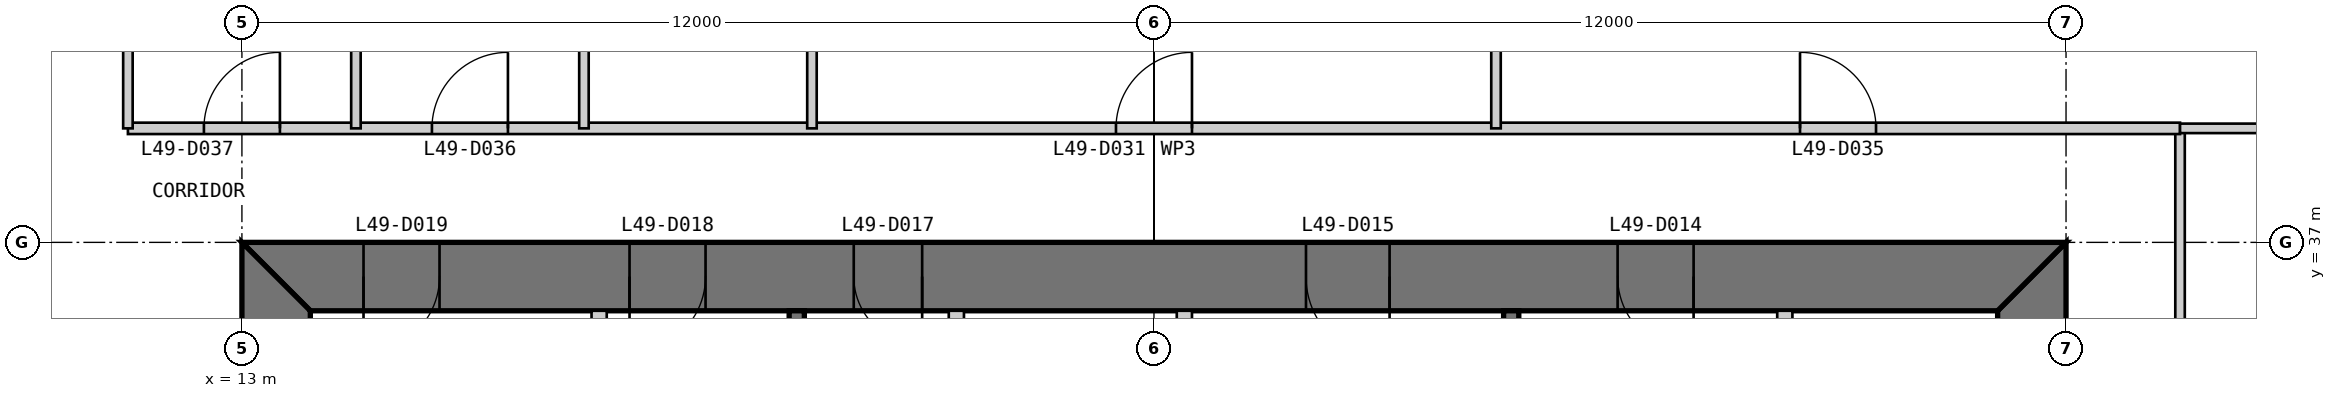
"""IFC4 building model, lengths in metres.
Left out: names, types, materials, properties, quantities, classifications, styles, units other than length and angle.
Written with IfcOpenShell. Run it as: python <this file> out.ifc"""

import sys

from ifc_helpers import new_model, si_unit, direction, frame, frame_2d, origin, place, context, subcontext, project, spatial, polyline, rectangle, outline, extrude, element, fill, save


model = new_model("IFC4")
c1 = context("Model", 3, precision=1e-05, world=origin(), true_north=direction((0.0, 1.0)))
c2 = subcontext(c1, "Body", "Model", "MODEL_VIEW")
j1 = project(units=[si_unit("LENGTHUNIT", "METRE"), si_unit("PLANEANGLEUNIT", "RADIAN")], contexts=[c1])
p1 = place(None, origin())
s1 = spatial("IfcSite", under=j1, at=p1, CompositionType="ELEMENT")
p2 = place(p1, origin())
s2 = spatial("IfcBuilding", under=s1, at=p2, CompositionType="ELEMENT")
p3 = place(p2, frame((0.0, 0.0, 209.8)))
s3 = spatial("IfcBuildingStorey", under=s2, at=p3, CompositionType="ELEMENT", Elevation=209.8)
p4 = place(p3, frame((36.55, 13.9, 0.0), z_axis=(0.0, 0.0, 1.0), x_axis=(0.0, 1.0, 0.0)))
e1 = element("IfcWall", 1, at=p4, inside=s3, PredefinedType="SHEAR", context=c2, shape_type="SweptSolid", body=[
    extrude(outline(polyline([(-0.9, -0.45), (23.1, -0.45), (22.2, 0.45), (0.0, 0.45), (-0.9, -0.45)])), origin(), (0.0, 0.0, 1.0), 4.0),
])
p5 = place(p4, frame((20.2, 0.0, 0.0)))
e2 = element("IfcOpeningElement", 2, at=p5, cuts=e1, PredefinedType="OPENING", context=c2, shape_type="SweptSolid", body=[
    extrude(rectangle(XDim=1.0, YDim=2.2, at=frame_2d((0.5, 1.1))), frame((0.0, 0.46, 0.0), z_axis=(0.0, -1.0, 0.0), x_axis=(1.0, 0.0, 0.0)), (0.0, 0.0, 1.0), 0.92),
])
p6 = place(p4, frame((17.25, 0.0, 0.0)))
e3 = element("IfcOpeningElement", 3, at=p6, cuts=e1, PredefinedType="OPENING", context=c2, shape_type="SweptSolid", body=[
    extrude(rectangle(XDim=0.9, YDim=2.2, at=frame_2d((0.45, 1.1))), frame((0.0, 0.46, 0.0), z_axis=(0.0, -1.0, 0.0), x_axis=(1.0, 0.0, 0.0)), (0.0, 0.0, 1.0), 0.92),
])
p7 = place(p3, frame((37.0, 36.55, 0.0), z_axis=(0.0, 0.0, 1.0), x_axis=(-1.0, 0.0, 0.0)))
e4 = element("IfcWall", 4, at=p7, inside=s3, PredefinedType="SHEAR", context=c2, shape_type="SweptSolid", body=[
    extrude(outline(polyline([(0.0, -0.45), (24.0, -0.45), (23.1, 0.45), (0.9, 0.45), (0.0, -0.45)])), origin(), (0.0, 0.0, 1.0), 4.0),
])
p8 = place(p7, frame((4.9, 0.0, 0.0)))
e5 = element("IfcOpeningElement", 5, at=p8, cuts=e4, PredefinedType="OPENING", context=c2, shape_type="SweptSolid", body=[
    extrude(rectangle(XDim=1.0, YDim=2.2, at=frame_2d((0.5, 1.1))), frame((0.0, 0.46, 0.0), z_axis=(0.0, -1.0, 0.0), x_axis=(1.0, 0.0, 0.0)), (0.0, 0.0, 1.0), 0.92),
])
p9 = place(p7, frame((8.9, 0.0, 0.0)))
e6 = element("IfcOpeningElement", 6, at=p9, cuts=e4, PredefinedType="OPENING", context=c2, shape_type="SweptSolid", body=[
    extrude(rectangle(XDim=1.1, YDim=2.2, at=frame_2d((0.55, 1.1))), frame((0.0, 0.46, 0.0), z_axis=(0.0, -1.0, 0.0), x_axis=(1.0, 0.0, 0.0)), (0.0, 0.0, 1.0), 0.92),
])
p10 = place(p7, frame((15.05, 0.0, 0.0)))
e7 = element("IfcOpeningElement", 7, at=p10, cuts=e4, PredefinedType="OPENING", context=c2, shape_type="SweptSolid", body=[
    extrude(rectangle(XDim=0.9, YDim=2.2, at=frame_2d((0.45, 1.1))), frame((0.0, 0.46, 0.0), z_axis=(0.0, -1.0, 0.0), x_axis=(1.0, 0.0, 0.0)), (0.0, 0.0, 1.0), 0.92),
])
p11 = place(p7, frame((17.9, 0.0, 0.0)))
e8 = element("IfcOpeningElement", 8, at=p11, cuts=e4, PredefinedType="OPENING", context=c2, shape_type="SweptSolid", body=[
    extrude(rectangle(XDim=1.0, YDim=2.2, at=frame_2d((0.5, 1.1))), frame((0.0, 0.46, 0.0), z_axis=(0.0, -1.0, 0.0), x_axis=(1.0, 0.0, 0.0)), (0.0, 0.0, 1.0), 0.92),
])
p12 = place(p7, frame((21.4, 0.0, 0.0)))
e9 = element("IfcOpeningElement", 9, at=p12, cuts=e4, PredefinedType="OPENING", context=c2, shape_type="SweptSolid", body=[
    extrude(rectangle(XDim=1.0, YDim=2.2, at=frame_2d((0.5, 1.1))), frame((0.0, 0.46, 0.0), z_axis=(0.0, -1.0, 0.0), x_axis=(1.0, 0.0, 0.0)), (0.0, 0.0, 1.0), 0.92),
])
p13 = place(p3, frame((13.45, 36.1, 0.0), z_axis=(0.0, 0.0, 1.0), x_axis=(0.0, -1.0, 0.0)))
e10 = element("IfcWall", 10, at=p13, inside=s3, PredefinedType="SHEAR", context=c2, shape_type="SweptSolid", body=[
    extrude(outline(polyline([(-0.9, -0.45), (23.1, -0.45), (22.2, 0.45), (0.0, 0.45), (-0.9, -0.45)])), origin(), (0.0, 0.0, 1.0), 4.0),
])
p14 = place(p13, frame((20.2, 0.0, 0.0)))
e11 = element("IfcOpeningElement", 11, at=p14, cuts=e10, PredefinedType="OPENING", context=c2, shape_type="SweptSolid", body=[
    extrude(rectangle(XDim=1.0, YDim=2.2, at=frame_2d((0.5, 1.1))), frame((0.0, 0.46, 0.0), z_axis=(0.0, -1.0, 0.0), x_axis=(1.0, 0.0, 0.0)), (0.0, 0.0, 1.0), 0.92),
])
p15 = place(p13, frame((17.25, 0.0, 0.0)))
e12 = element("IfcOpeningElement", 12, at=p15, cuts=e10, PredefinedType="OPENING", context=c2, shape_type="SweptSolid", body=[
    extrude(rectangle(XDim=0.9, YDim=2.2, at=frame_2d((0.45, 1.1))), frame((0.0, 0.46, 0.0), z_axis=(0.0, -1.0, 0.0), x_axis=(1.0, 0.0, 0.0)), (0.0, 0.0, 1.0), 0.92),
])
p16 = place(p3, frame((33.3, 36.1, 0.0), z_axis=(0.0, 0.0, 1.0), x_axis=(0.0, -1.0, 0.0)))
e13 = element("IfcWall", 13, at=p16, inside=s3, PredefinedType="PARTITIONING", context=c2, shape_type="SweptSolid", body=[
    extrude(rectangle(XDim=16.1, YDim=0.2, at=frame_2d((8.05, 0.0))), origin(), (0.0, 0.0, 1.0), 3.8),
])
p17 = place(p3, frame((29.7, 36.1, 0.0), z_axis=(0.0, 0.0, 1.0), x_axis=(0.0, -1.0, 0.0)))
e14 = element("IfcWall", 14, at=p17, inside=s3, PredefinedType="SOLIDWALL", context=c2, shape_type="SweptSolid", body=[
    extrude(rectangle(XDim=16.1, YDim=0.2, at=frame_2d((8.05, 0.0))), origin(), (0.0, 0.0, 1.0), 3.8),
])
p18 = place(p17, frame((7.217, 0.0, 0.0)))
e15 = element("IfcOpeningElement", 15, at=p18, cuts=e14, PredefinedType="OPENING", context=c2, shape_type="SweptSolid", body=[
    extrude(rectangle(XDim=1.1, YDim=2.2, at=frame_2d((0.55, 1.1))), frame((0.0, 0.11, 0.0), z_axis=(0.0, -1.0, 0.0), x_axis=(1.0, 0.0, 0.0)), (0.0, 0.0, 1.0), 0.22),
])
p19 = place(p17, frame((10.55, 0.0, 0.0)))
e16 = element("IfcOpeningElement", 16, at=p19, cuts=e14, PredefinedType="OPENING", context=c2, shape_type="SweptSolid", body=[
    extrude(rectangle(XDim=1.1, YDim=2.2, at=frame_2d((0.55, 1.1))), frame((0.0, 0.11, 0.0), z_axis=(0.0, -1.0, 0.0), x_axis=(1.0, 0.0, 0.0)), (0.0, 0.0, 1.0), 0.22),
])
p20 = place(p17, frame((13.883, 0.0, 0.0)))
e17 = element("IfcOpeningElement", 17, at=p20, cuts=e14, PredefinedType="OPENING", context=c2, shape_type="SweptSolid", body=[
    extrude(rectangle(XDim=1.1, YDim=2.2, at=frame_2d((0.55, 1.1))), frame((0.0, 0.11, 0.0), z_axis=(0.0, -1.0, 0.0), x_axis=(1.0, 0.0, 0.0)), (0.0, 0.0, 1.0), 0.22),
])
p21 = place(p3, frame((25.4, 36.1, 0.0), z_axis=(0.0, 0.0, 1.0), x_axis=(0.0, -1.0, 0.0)))
e18 = element("IfcWall", 18, at=p21, inside=s3, PredefinedType="PARTITIONING", context=c2, shape_type="SweptSolid", body=[
    extrude(rectangle(XDim=3.3, YDim=0.2, at=frame_2d((1.65, 0.0))), origin(), (0.0, 0.0, 1.0), 3.8),
])
p22 = place(p21, frame((0.9, 0.0, 0.0)))
e19 = element("IfcOpeningElement", 19, at=p22, cuts=e18, PredefinedType="OPENING", context=c2, shape_type="SweptSolid", body=[
    extrude(rectangle(XDim=1.1, YDim=2.2, at=frame_2d((0.55, 1.1))), frame((0.0, 0.11, 0.0), z_axis=(0.0, -1.0, 0.0), x_axis=(1.0, 0.0, 0.0)), (0.0, 0.0, 1.0), 0.22),
])
p23 = place(p3, frame((22.4, 36.1, 0.0), z_axis=(0.0, 0.0, 1.0), x_axis=(0.0, -1.0, 0.0)))
e20 = element("IfcWall", 20, at=p23, inside=s3, PredefinedType="PARTITIONING", context=c2, shape_type="SweptSolid", body=[
    extrude(rectangle(XDim=3.3, YDim=0.2, at=frame_2d((1.65, 0.0))), origin(), (0.0, 0.0, 1.0), 3.8),
])
p24 = place(p3, frame((20.3, 36.1, 0.0), z_axis=(0.0, 0.0, 1.0), x_axis=(0.0, -1.0, 0.0)))
e21 = element("IfcWall", 21, at=p24, inside=s3, PredefinedType="SOLIDWALL", context=c2, shape_type="SweptSolid", body=[
    extrude(rectangle(XDim=6.1, YDim=0.2, at=frame_2d((3.05, 0.0))), origin(), (0.0, 0.0, 1.0), 3.8),
])
p25 = place(p3, frame((17.7, 36.1, 0.0), z_axis=(0.0, 0.0, 1.0), x_axis=(0.0, -1.0, 0.0)))
e22 = element("IfcWall", 22, at=p25, inside=s3, PredefinedType="PARTITIONING", context=c2, shape_type="SweptSolid", body=[
    extrude(rectangle(XDim=6.1, YDim=0.2, at=frame_2d((3.05, 0.0))), origin(), (0.0, 0.0, 1.0), 3.8),
])
p26 = place(p3, frame((38.5, 35.5, 0.0), z_axis=(0.0, 0.0, 1.0), x_axis=(0.0, 1.0, 0.0)))
e23 = element("IfcWall", 23, at=p26, inside=s3, PredefinedType="PARTITIONING", context=c2, shape_type="SweptSolid", body=[
    extrude(rectangle(XDim=3.0, YDim=0.125, at=frame_2d((1.5, 0.0))), origin(), (0.0, 0.0, 1.0), 3.85),
])
p27 = place(p3, frame((38.5, 38.5, 0.0), z_axis=(0.0, 0.0, 1.0), x_axis=(-1.0, 0.0, 0.0)))
e24 = element("IfcWall", 24, at=p27, inside=s3, PredefinedType="PARTITIONING", context=c2, shape_type="SweptSolid", body=[
    extrude(rectangle(XDim=27.0, YDim=0.15, at=frame_2d((13.5, 0.0))), origin(), (0.0, 0.0, 1.0), 3.85),
])
p28 = place(p27, frame((13.0, 0.0, 0.0)))
e25 = element("IfcOpeningElement", 25, at=p28, cuts=e24, PredefinedType="OPENING", context=c2, shape_type="SweptSolid", body=[
    extrude(rectangle(XDim=1.0, YDim=2.2, at=frame_2d((0.5, 1.1))), frame((0.0, 0.085, 0.0), z_axis=(0.0, -1.0, 0.0), x_axis=(1.0, 0.0, 0.0)), (0.0, 0.0, 1.0), 0.17),
])
p29 = place(p27, frame((4.0, 0.0, 0.0)))
e26 = element("IfcOpeningElement", 26, at=p29, cuts=e24, PredefinedType="OPENING", context=c2, shape_type="SweptSolid", body=[
    extrude(rectangle(XDim=1.0, YDim=2.2, at=frame_2d((0.5, 1.1))), frame((0.0, 0.085, 0.0), z_axis=(0.0, -1.0, 0.0), x_axis=(1.0, 0.0, 0.0)), (0.0, 0.0, 1.0), 0.17),
])
p30 = place(p27, frame((22.0, 0.0, 0.0)))
e27 = element("IfcOpeningElement", 27, at=p30, cuts=e24, PredefinedType="OPENING", context=c2, shape_type="SweptSolid", body=[
    extrude(rectangle(XDim=1.0, YDim=2.2, at=frame_2d((0.5, 1.1))), frame((0.0, 0.085, 0.0), z_axis=(0.0, -1.0, 0.0), x_axis=(1.0, 0.0, 0.0)), (0.0, 0.0, 1.0), 0.17),
])
p31 = place(p27, frame((25.0, 0.0, 0.0)))
e28 = element("IfcOpeningElement", 28, at=p31, cuts=e24, PredefinedType="OPENING", context=c2, shape_type="SweptSolid", body=[
    extrude(rectangle(XDim=1.0, YDim=2.2, at=frame_2d((0.5, 1.1))), frame((0.0, 0.085, 0.0), z_axis=(0.0, -1.0, 0.0), x_axis=(1.0, 0.0, 0.0)), (0.0, 0.0, 1.0), 0.17),
])
for number, where, z_axis, x_axis in (
    (29, (49.85, 38.5, 0.0), (0.0, 0.0, 1.0), (-1.0, 0.0, 0.0)),
    (30, (29.5, 49.85, 0.0), (0.0, 0.0, 1.0), (0.0, -1.0, 0.0)),
):
    element("IfcWall", number, at=place(p3, frame(where, z_axis=z_axis, x_axis=x_axis)), inside=s3, PredefinedType="PARTITIONING", context=c2, shape_type="SweptSolid", body=[
        extrude(rectangle(XDim=11.35, YDim=0.125, at=frame_2d((5.675, 0.0))), origin(), (0.0, 0.0, 1.0), 3.85),
    ])
p32 = place(p3, frame((20.5, 46.0, 0.0), z_axis=(0.0, 0.0, 1.0), x_axis=(0.0, -1.0, 0.0)))
e31 = element("IfcWall", 31, at=p32, inside=s3, PredefinedType="PARTITIONING", context=c2, shape_type="SweptSolid", body=[
    extrude(rectangle(XDim=7.5, YDim=0.125, at=frame_2d((3.75, 0.0))), origin(), (0.0, 0.0, 1.0), 3.85),
])
p33 = place(p32, frame((3.3, 0.0, 0.0)))
e32 = element("IfcOpeningElement", 32, at=p33, cuts=e31, PredefinedType="OPENING", context=c2, shape_type="SweptSolid", body=[
    extrude(rectangle(XDim=0.9, YDim=2.2, at=frame_2d((0.45, 1.1))), frame((0.0, 0.073, 0.0), z_axis=(0.0, -1.0, 0.0), x_axis=(1.0, 0.0, 0.0)), (0.0, 0.0, 1.0), 0.145),
])
p34 = place(p3, frame((17.5, 49.85, 0.0), z_axis=(0.0, 0.0, 1.0), x_axis=(0.0, -1.0, 0.0)))
e33 = element("IfcWall", 33, at=p34, inside=s3, PredefinedType="PARTITIONING", context=c2, shape_type="SweptSolid", body=[
    extrude(rectangle(XDim=11.35, YDim=0.125, at=frame_2d((5.675, 0.0))), origin(), (0.0, 0.0, 1.0), 3.85),
])
p35 = place(p3, frame((14.5, 46.0, 0.0), z_axis=(0.0, 0.0, 1.0), x_axis=(0.0, -1.0, 0.0)))
e34 = element("IfcWall", 34, at=p35, inside=s3, PredefinedType="PARTITIONING", context=c2, shape_type="SweptSolid", body=[
    extrude(rectangle(XDim=7.5, YDim=0.125, at=frame_2d((3.75, 0.0))), origin(), (0.0, 0.0, 1.0), 3.85),
])
p36 = place(p3, frame((11.5, 49.85, 0.0), z_axis=(0.0, 0.0, 1.0), x_axis=(0.0, -1.0, 0.0)))
e35 = element("IfcWall", 35, at=p36, inside=s3, PredefinedType="PARTITIONING", context=c2, shape_type="SweptSolid", body=[
    extrude(rectangle(XDim=11.35, YDim=0.125, at=frame_2d((5.675, 0.0))), origin(), (0.0, 0.0, 1.0), 3.85),
])
p37 = place(p8, origin())
e36 = element("IfcDoor", 36, at=p37, inside=s3, OperationType="SINGLE_SWING_LEFT", PredefinedType="DOOR", context=c2, shape_type="SweptSolid", body=[
    extrude(rectangle(XDim=1.0, YDim=2.2, at=frame_2d((0.5, 1.1))), frame((0.0, 0.025, 0.0), z_axis=(0.0, -1.0, 0.0), x_axis=(1.0, 0.0, 0.0)), (0.0, 0.0, 1.0), 0.05),
    extrude(outline(polyline([(0.0, 0.0), (0.04, 0.0), (0.04, 2.16), (0.96, 2.16), (0.96, 0.0), (1.0, 0.0), (1.0, 2.2), (0.0, 2.2), (0.0, 0.0)])), frame((0.0, 0.3, 0.0), z_axis=(0.0, -1.0, 0.0), x_axis=(1.0, 0.0, 0.0)), (0.0, 0.0, 1.0), 0.6),
])
fill(e5, e36)
p38 = place(p9, origin())
e37 = element("IfcDoor", 37, at=p38, inside=s3, OperationType="SINGLE_SWING_LEFT", PredefinedType="DOOR", context=c2, shape_type="SweptSolid", body=[
    extrude(rectangle(XDim=1.1, YDim=2.2, at=frame_2d((0.55, 1.1))), frame((0.0, 0.025, 0.0), z_axis=(0.0, -1.0, 0.0), x_axis=(1.0, 0.0, 0.0)), (0.0, 0.0, 1.0), 0.05),
    extrude(outline(polyline([(0.0, 0.0), (0.04, 0.0), (0.04, 2.16), (1.06, 2.16), (1.06, 0.0), (1.1, 0.0), (1.1, 2.2), (0.0, 2.2), (0.0, 0.0)])), frame((0.0, 0.3, 0.0), z_axis=(0.0, -1.0, 0.0), x_axis=(1.0, 0.0, 0.0)), (0.0, 0.0, 1.0), 0.6),
])
fill(e6, e37)
p39 = place(p10, origin())
e38 = element("IfcDoor", 38, at=p39, inside=s3, OperationType="SINGLE_SWING_LEFT", PredefinedType="DOOR", context=c2, shape_type="SweptSolid", body=[
    extrude(rectangle(XDim=0.9, YDim=2.2, at=frame_2d((0.45, 1.1))), frame((0.0, 0.025, 0.0), z_axis=(0.0, -1.0, 0.0), x_axis=(1.0, 0.0, 0.0)), (0.0, 0.0, 1.0), 0.05),
    extrude(outline(polyline([(0.0, 0.0), (0.04, 0.0), (0.04, 2.16), (0.86, 2.16), (0.86, 0.0), (0.9, 0.0), (0.9, 2.2), (0.0, 2.2), (0.0, 0.0)])), frame((0.0, 0.3, 0.0), z_axis=(0.0, -1.0, 0.0), x_axis=(1.0, 0.0, 0.0)), (0.0, 0.0, 1.0), 0.6),
])
fill(e7, e38)
p40 = place(p11, origin())
e39 = element("IfcDoor", 39, at=p40, inside=s3, OperationType="SINGLE_SWING_RIGHT", PredefinedType="DOOR", context=c2, shape_type="SweptSolid", body=[
    extrude(rectangle(XDim=1.0, YDim=2.2, at=frame_2d((0.5, 1.1))), frame((0.0, 0.025, 0.0), z_axis=(0.0, -1.0, 0.0), x_axis=(1.0, 0.0, 0.0)), (0.0, 0.0, 1.0), 0.05),
    extrude(outline(polyline([(0.0, 0.0), (0.04, 0.0), (0.04, 2.16), (0.96, 2.16), (0.96, 0.0), (1.0, 0.0), (1.0, 2.2), (0.0, 2.2), (0.0, 0.0)])), frame((0.0, 0.3, 0.0), z_axis=(0.0, -1.0, 0.0), x_axis=(1.0, 0.0, 0.0)), (0.0, 0.0, 1.0), 0.6),
])
fill(e8, e39)
p41 = place(p12, origin())
e40 = element("IfcDoor", 40, at=p41, inside=s3, OperationType="SINGLE_SWING_RIGHT", PredefinedType="DOOR", context=c2, shape_type="SweptSolid", body=[
    extrude(rectangle(XDim=1.0, YDim=2.2, at=frame_2d((0.5, 1.1))), frame((0.0, 0.025, 0.0), z_axis=(0.0, -1.0, 0.0), x_axis=(1.0, 0.0, 0.0)), (0.0, 0.0, 1.0), 0.05),
    extrude(outline(polyline([(0.0, 0.0), (0.04, 0.0), (0.04, 2.16), (0.96, 2.16), (0.96, 0.0), (1.0, 0.0), (1.0, 2.2), (0.0, 2.2), (0.0, 0.0)])), frame((0.0, 0.3, 0.0), z_axis=(0.0, -1.0, 0.0), x_axis=(1.0, 0.0, 0.0)), (0.0, 0.0, 1.0), 0.6),
])
fill(e9, e40)
p42 = place(p28, frame((1.0, 0.0, 0.0), z_axis=(0.0, 0.0, 1.0), x_axis=(-1.0, 0.0, 0.0)))
e41 = element("IfcDoor", 41, at=p42, inside=s3, OperationType="SINGLE_SWING_RIGHT", PredefinedType="DOOR", context=c2, shape_type="SweptSolid", body=[
    extrude(rectangle(XDim=1.0, YDim=2.2, at=frame_2d((0.5, 1.1))), frame((0.0, 0.025, 0.0), z_axis=(0.0, -1.0, 0.0), x_axis=(1.0, 0.0, 0.0)), (0.0, 0.0, 1.0), 0.05),
])
fill(e25, e41)
p43 = place(p29, frame((1.0, 0.0, 0.0), z_axis=(0.0, 0.0, 1.0), x_axis=(-1.0, 0.0, 0.0)))
e42 = element("IfcDoor", 42, at=p43, inside=s3, OperationType="SINGLE_SWING_LEFT", PredefinedType="DOOR", context=c2, shape_type="SweptSolid", body=[
    extrude(rectangle(XDim=1.0, YDim=2.2, at=frame_2d((0.5, 1.1))), frame((0.0, 0.025, 0.0), z_axis=(0.0, -1.0, 0.0), x_axis=(1.0, 0.0, 0.0)), (0.0, 0.0, 1.0), 0.05),
])
fill(e26, e42)
p44 = place(p30, frame((1.0, 0.0, 0.0), z_axis=(0.0, 0.0, 1.0), x_axis=(-1.0, 0.0, 0.0)))
e43 = element("IfcDoor", 43, at=p44, inside=s3, OperationType="SINGLE_SWING_RIGHT", PredefinedType="DOOR", context=c2, shape_type="SweptSolid", body=[
    extrude(rectangle(XDim=1.0, YDim=2.2, at=frame_2d((0.5, 1.1))), frame((0.0, 0.025, 0.0), z_axis=(0.0, -1.0, 0.0), x_axis=(1.0, 0.0, 0.0)), (0.0, 0.0, 1.0), 0.05),
])
fill(e27, e43)
p45 = place(p31, frame((1.0, 0.0, 0.0), z_axis=(0.0, 0.0, 1.0), x_axis=(-1.0, 0.0, 0.0)))
e44 = element("IfcDoor", 44, at=p45, inside=s3, OperationType="SINGLE_SWING_RIGHT", PredefinedType="DOOR", context=c2, shape_type="SweptSolid", body=[
    extrude(rectangle(XDim=1.0, YDim=2.2, at=frame_2d((0.5, 1.1))), frame((0.0, 0.025, 0.0), z_axis=(0.0, -1.0, 0.0), x_axis=(1.0, 0.0, 0.0)), (0.0, 0.0, 1.0), 0.05),
])
fill(e28, e44)
save(model, sys.argv[1])
